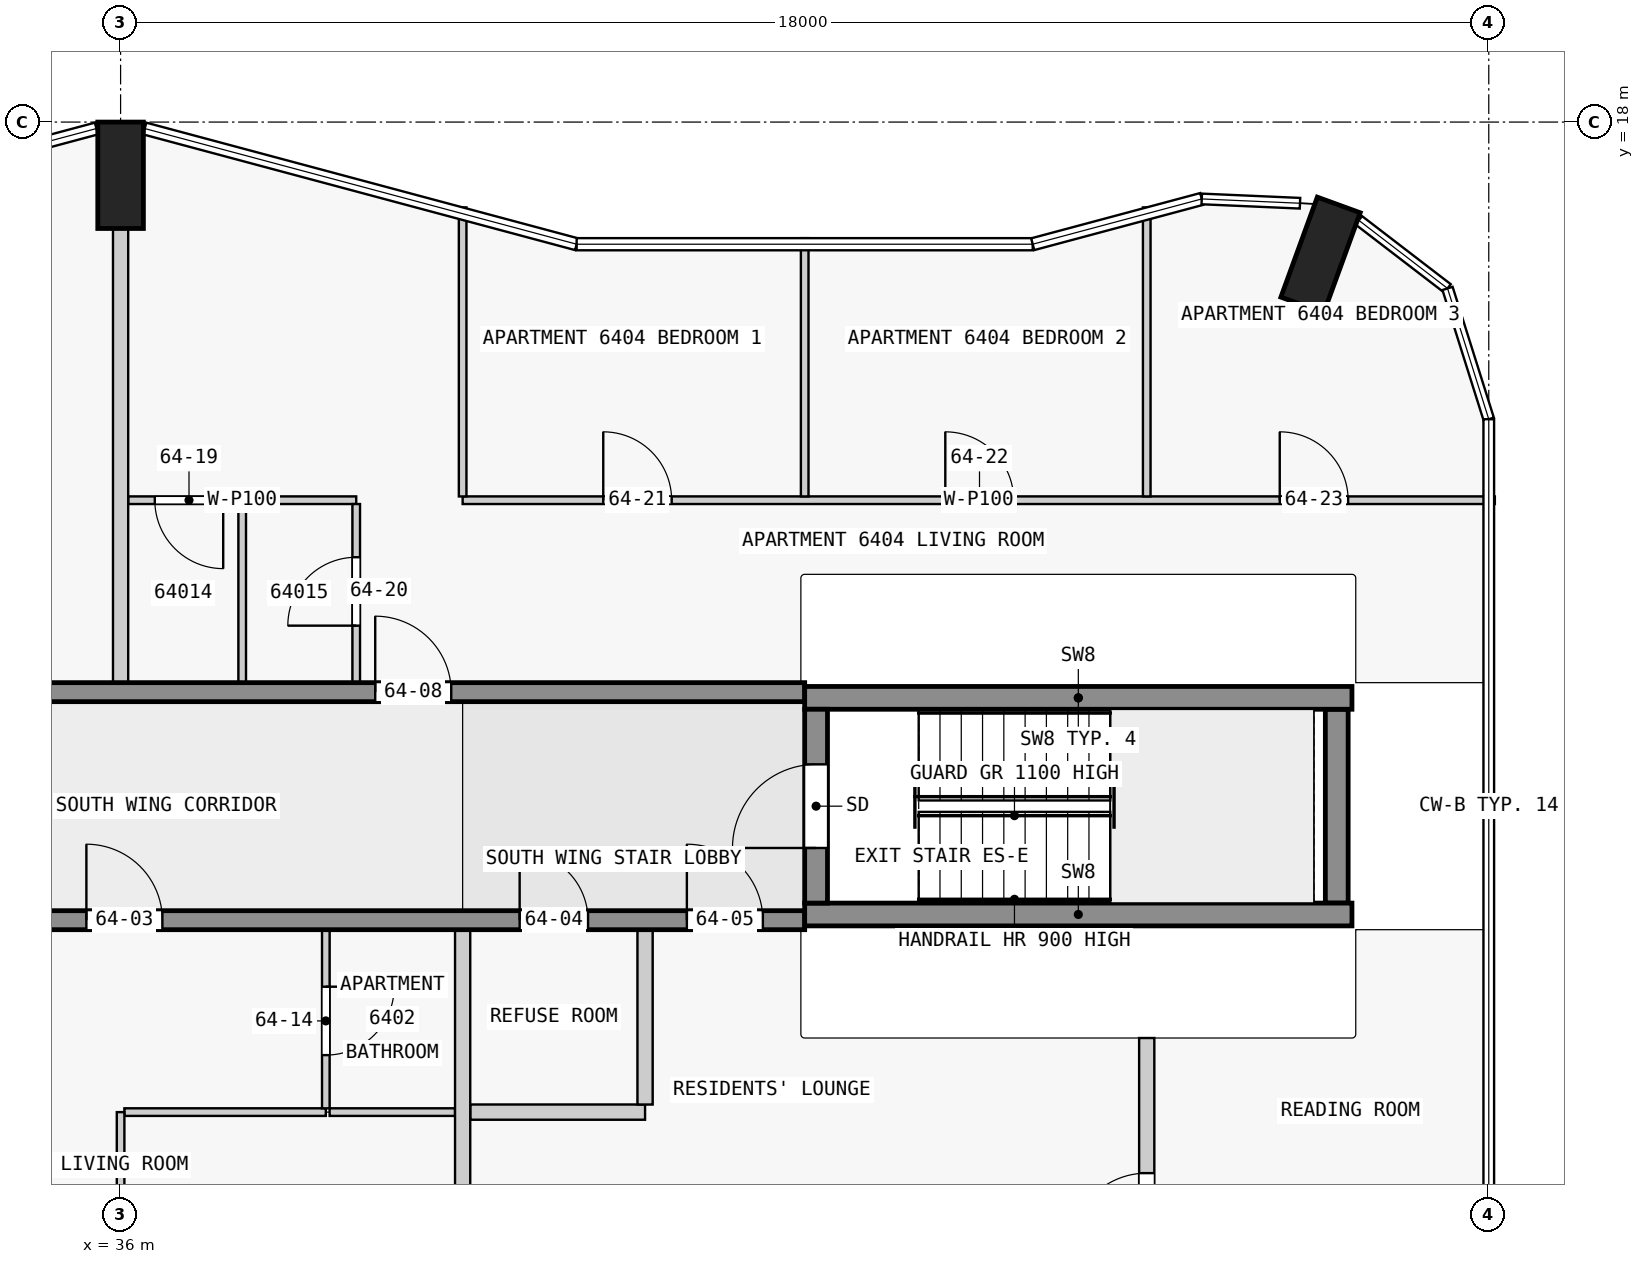
"""IFC4 building model, lengths in metres.
Left out: names, types, materials, properties, quantities, classifications, styles, units other than length and angle.
Written with IfcOpenShell. Run it as: python <this file> out.ifc"""

import sys

from ifc_helpers import new_model, si_unit, direction, frame, frame_2d, origin, origin_2d, place, context, subcontext, project, spatial, rectangle, extrude, element, fill, save


model = new_model("IFC4")
c1 = context("Model", 3, precision=1e-05, world=origin(), true_north=direction((0.0, 1.0)))
c2 = subcontext(c1, "Body", "Model", "MODEL_VIEW")
j1 = project(units=[si_unit("LENGTHUNIT", "METRE"), si_unit("PLANEANGLEUNIT", "RADIAN")], contexts=[c1])
p1 = place(None, origin())
s1 = spatial("IfcSite", under=j1, at=p1, CompositionType="ELEMENT")
p2 = place(p1, origin())
s2 = spatial("IfcBuilding", under=s1, at=p2, CompositionType="ELEMENT")
p3 = place(p2, frame((0.0, 0.0, 245.9)))
s3 = spatial("IfcBuildingStorey", under=s2, at=p3, CompositionType="ELEMENT", Elevation=245.9)
for number, where, z_axis, x_axis in (
    (1, (51.787, 16.252, 0.0), (0.0, 0.0, 1.0), (-0.94, 0.342, 0.0)),
    (2, (36.0, 17.3, 0.0), (0.0, 0.0, 1.0), (1.0, 0.0, 0.0)),
):
    element("IfcColumn", number, at=place(p3, frame(where, z_axis=z_axis, x_axis=x_axis)), inside=s3, PredefinedType="COLUMN", context=c2, shape_type="SweptSolid", body=[
        extrude(rectangle(XDim=0.6, YDim=1.4, at=origin_2d()), origin(), (0.0, 0.0, 1.0), 3.5),
    ])
p4 = place(p3, frame((45.15, 7.725, 0.0), z_axis=(0.0, 0.0, 1.0), x_axis=(0.0, 1.0, 0.0)))
e3 = element("IfcWall", 3, at=p4, inside=s3, PredefinedType="SHEAR", context=c2, shape_type="SweptSolid", body=[
    extrude(rectangle(XDim=2.55, YDim=0.3, at=frame_2d((1.275, 0.0))), origin(), (0.0, 0.0, 1.0), 3.5),
])
p5 = place(p4, frame((0.725, 0.0, 0.0)))
e4 = element("IfcOpeningElement", 4, at=p5, cuts=e3, PredefinedType="OPENING", context=c2, shape_type="SweptSolid", body=[
    extrude(rectangle(XDim=1.1, YDim=2.1, at=frame_2d((0.55, 1.05))), frame((0.0, 0.16, 0.0), z_axis=(0.0, -1.0, 0.0), x_axis=(1.0, 0.0, 0.0)), (0.0, 0.0, 1.0), 0.32),
])
p6 = place(p3, frame((52.0, 7.725, 0.0), z_axis=(0.0, 0.0, 1.0), x_axis=(0.0, 1.0, 0.0)))
e5 = element("IfcWall", 5, at=p6, inside=s3, PredefinedType="SHEAR", context=c2, shape_type="SweptSolid", body=[
    extrude(rectangle(XDim=2.55, YDim=0.3, at=frame_2d((1.275, 0.0))), origin(), (0.0, 0.0, 1.0), 3.5),
])
for number, where, z_axis, x_axis in (
    (6, (45.0, 7.575, 0.0), (0.0, 0.0, 1.0), (1.0, 0.0, 0.0)),
    (7, (45.0, 10.425, 0.0), (0.0, 0.0, 1.0), (1.0, 0.0, 0.0)),
):
    element("IfcWall", number, at=place(p3, frame(where, z_axis=z_axis, x_axis=x_axis)), inside=s3, PredefinedType="SHEAR", context=c2, shape_type="SweptSolid", body=[
        extrude(rectangle(XDim=7.2, YDim=0.3, at=frame_2d((3.6, 0.0))), origin(), (0.0, 0.0, 1.0), 3.5),
    ])
p7 = place(p3, frame((22.5, 7.5, 0.0), z_axis=(0.0, 0.0, 1.0), x_axis=(1.0, 0.0, 0.0)))
e8 = element("IfcWall", 8, at=p7, inside=s3, PredefinedType="SHEAR", context=c2, shape_type="SweptSolid", body=[
    extrude(rectangle(XDim=22.5, YDim=0.25, at=frame_2d((11.25, 0.0))), origin(), (0.0, 0.0, 1.0), 3.25),
])
p8 = place(p7, frame((1.75, 0.0, 0.0)))
e9 = element("IfcOpeningElement", 9, at=p8, cuts=e8, PredefinedType="OPENING", context=c2, shape_type="SweptSolid", body=[
    extrude(rectangle(XDim=1.0, YDim=2.1, at=frame_2d((0.5, 1.05))), frame((0.0, 0.135, 0.0), z_axis=(0.0, -1.0, 0.0), x_axis=(1.0, 0.0, 0.0)), (0.0, 0.0, 1.0), 0.27),
])
p9 = place(p7, frame((5.85, 0.0, 0.0)))
e10 = element("IfcOpeningElement", 10, at=p9, cuts=e8, PredefinedType="OPENING", context=c2, shape_type="SweptSolid", body=[
    extrude(rectangle(XDim=1.8, YDim=2.1, at=frame_2d((0.9, 1.05))), frame((0.0, 0.135, 0.0), z_axis=(0.0, -1.0, 0.0), x_axis=(1.0, 0.0, 0.0)), (0.0, 0.0, 1.0), 0.27),
])
p10 = place(p7, frame((13.05, 0.0, 0.0)))
e11 = element("IfcOpeningElement", 11, at=p10, cuts=e8, PredefinedType="OPENING", context=c2, shape_type="SweptSolid", body=[
    extrude(rectangle(XDim=1.0, YDim=2.1, at=frame_2d((0.5, 1.05))), frame((0.0, 0.135, 0.0), z_axis=(0.0, -1.0, 0.0), x_axis=(1.0, 0.0, 0.0)), (0.0, 0.0, 1.0), 0.27),
])
p11 = place(p7, frame((18.75, 0.0, 0.0)))
e12 = element("IfcOpeningElement", 12, at=p11, cuts=e8, PredefinedType="OPENING", context=c2, shape_type="SweptSolid", body=[
    extrude(rectangle(XDim=0.9, YDim=2.1, at=frame_2d((0.45, 1.05))), frame((0.0, 0.135, 0.0), z_axis=(0.0, -1.0, 0.0), x_axis=(1.0, 0.0, 0.0)), (0.0, 0.0, 1.0), 0.27),
])
p12 = place(p7, frame((20.95, 0.0, 0.0)))
e13 = element("IfcOpeningElement", 13, at=p12, cuts=e8, PredefinedType="OPENING", context=c2, shape_type="SweptSolid", body=[
    extrude(rectangle(XDim=1.0, YDim=2.1, at=frame_2d((0.5, 1.05))), frame((0.0, 0.135, 0.0), z_axis=(0.0, -1.0, 0.0), x_axis=(1.0, 0.0, 0.0)), (0.0, 0.0, 1.0), 0.27),
])
p13 = place(p3, frame((22.5, 10.5, 0.0), z_axis=(0.0, 0.0, 1.0), x_axis=(1.0, 0.0, 0.0)))
e14 = element("IfcWall", 14, at=p13, inside=s3, PredefinedType="SHEAR", context=c2, shape_type="SweptSolid", body=[
    extrude(rectangle(XDim=22.5, YDim=0.25, at=frame_2d((11.25, 0.0))), origin(), (0.0, 0.0, 1.0), 3.25),
])
p14 = place(p13, frame((4.05, 0.0, 0.0)))
e15 = element("IfcOpeningElement", 15, at=p14, cuts=e14, PredefinedType="OPENING", context=c2, shape_type="SweptSolid", body=[
    extrude(rectangle(XDim=1.0, YDim=2.1, at=frame_2d((0.5, 1.05))), frame((0.0, 0.135, 0.0), z_axis=(0.0, -1.0, 0.0), x_axis=(1.0, 0.0, 0.0)), (0.0, 0.0, 1.0), 0.27),
])
p15 = place(p13, frame((10.75, 0.0, 0.0)))
e16 = element("IfcOpeningElement", 16, at=p15, cuts=e14, PredefinedType="OPENING", context=c2, shape_type="SweptSolid", body=[
    extrude(rectangle(XDim=1.0, YDim=2.1, at=frame_2d((0.5, 1.05))), frame((0.0, 0.135, 0.0), z_axis=(0.0, -1.0, 0.0), x_axis=(1.0, 0.0, 0.0)), (0.0, 0.0, 1.0), 0.27),
])
p16 = place(p13, frame((16.85, 0.0, 0.0)))
e17 = element("IfcOpeningElement", 17, at=p16, cuts=e14, PredefinedType="OPENING", context=c2, shape_type="SweptSolid", body=[
    extrude(rectangle(XDim=1.0, YDim=2.1, at=frame_2d((0.5, 1.05))), frame((0.0, 0.135, 0.0), z_axis=(0.0, -1.0, 0.0), x_axis=(1.0, 0.0, 0.0)), (0.0, 0.0, 1.0), 0.27),
])
p17 = place(p3, frame((38.7, 4.975, 0.0), z_axis=(0.0, 0.0, 1.0), x_axis=(-1.0, 0.0, 0.0)))
e18 = element("IfcWall", 18, at=p17, inside=s3, PredefinedType="PARTITIONING", context=c2, shape_type="SweptSolid", body=[
    extrude(rectangle(XDim=2.65, YDim=0.1, at=frame_2d((1.325, 0.0))), origin(), (0.0, 0.0, 1.0), 3.25),
])
p18 = place(p3, frame((38.75, 4.975, 0.0), z_axis=(0.0, 0.0, 1.0), x_axis=(1.0, 0.0, 0.0)))
e19 = element("IfcWall", 19, at=p18, inside=s3, PredefinedType="PARTITIONING", context=c2, shape_type="SweptSolid", body=[
    extrude(rectangle(XDim=1.65, YDim=0.1, at=frame_2d((0.825, 0.0))), origin(), (0.0, 0.0, 1.0), 3.25),
])
p19 = place(p3, frame((40.6, 4.975, 0.0), z_axis=(0.0, 0.0, 1.0), x_axis=(1.0, 0.0, 0.0)))
e20 = element("IfcWall", 20, at=p19, inside=s3, PredefinedType="PARTITIONING", context=c2, shape_type="SweptSolid", body=[
    extrude(rectangle(XDim=2.3, YDim=0.2, at=frame_2d((1.15, 0.0))), origin(), (0.0, 0.0, 1.0), 3.25),
])
p20 = place(p3, frame((39.1, 13.025, 0.0), z_axis=(0.0, 0.0, 1.0), x_axis=(-1.0, 0.0, 0.0)))
e21 = element("IfcWall", 21, at=p20, inside=s3, PredefinedType="PARTITIONING", context=c2, shape_type="SweptSolid", body=[
    extrude(rectangle(XDim=3.0, YDim=0.1, at=frame_2d((1.5, 0.0))), origin(), (0.0, 0.0, 1.0), 3.25),
])
p21 = place(p20, frame((1.75, 0.0, 0.0)))
e22 = element("IfcOpeningElement", 22, at=p21, cuts=e21, PredefinedType="OPENING", context=c2, shape_type="SweptSolid", body=[
    extrude(rectangle(XDim=0.9, YDim=2.1, at=frame_2d((0.45, 1.05))), frame((0.0, 0.06, 0.0), z_axis=(0.0, -1.0, 0.0), x_axis=(1.0, 0.0, 0.0)), (0.0, 0.0, 1.0), 0.12),
])
p22 = place(p3, frame((40.5, 13.025, 0.0), z_axis=(0.0, 0.0, 1.0), x_axis=(1.0, 0.0, 0.0)))
e23 = element("IfcWall", 23, at=p22, inside=s3, PredefinedType="PARTITIONING", context=c2, shape_type="SweptSolid", body=[
    extrude(rectangle(XDim=13.58, YDim=0.1, at=frame_2d((6.79, 0.0))), origin(), (0.0, 0.0, 1.0), 3.25),
])
p23 = place(p22, frame((1.85, 0.0, 0.0)))
e24 = element("IfcOpeningElement", 24, at=p23, cuts=e23, PredefinedType="OPENING", context=c2, shape_type="SweptSolid", body=[
    extrude(rectangle(XDim=0.9, YDim=2.1, at=frame_2d((0.45, 1.05))), frame((0.0, 0.06, 0.0), z_axis=(0.0, -1.0, 0.0), x_axis=(1.0, 0.0, 0.0)), (0.0, 0.0, 1.0), 0.12),
])
p24 = place(p22, frame((6.35, 0.0, 0.0)))
e25 = element("IfcOpeningElement", 25, at=p24, cuts=e23, PredefinedType="OPENING", context=c2, shape_type="SweptSolid", body=[
    extrude(rectangle(XDim=0.9, YDim=2.1, at=frame_2d((0.45, 1.05))), frame((0.0, 0.06, 0.0), z_axis=(0.0, -1.0, 0.0), x_axis=(1.0, 0.0, 0.0)), (0.0, 0.0, 1.0), 0.12),
])
p25 = place(p22, frame((10.75, 0.0, 0.0)))
e26 = element("IfcOpeningElement", 26, at=p25, cuts=e23, PredefinedType="OPENING", context=c2, shape_type="SweptSolid", body=[
    extrude(rectangle(XDim=0.9, YDim=2.1, at=frame_2d((0.45, 1.05))), frame((0.0, 0.06, 0.0), z_axis=(0.0, -1.0, 0.0), x_axis=(1.0, 0.0, 0.0)), (0.0, 0.0, 1.0), 0.12),
])
p26 = place(p3, frame((36.0, 4.975, 0.0), z_axis=(0.0, 0.0, 1.0), x_axis=(0.0, -1.0, 0.0)))
e27 = element("IfcWall", 27, at=p26, inside=s3, PredefinedType="PARTITIONING", context=c2, shape_type="SweptSolid", body=[
    extrude(rectangle(XDim=3.575, YDim=0.1, at=frame_2d((1.788, 0.0))), origin(), (0.0, 0.0, 1.0), 3.25),
])
p27 = place(p26, frame((1.35, 0.0, 0.0)))
e28 = element("IfcOpeningElement", 28, at=p27, cuts=e27, PredefinedType="OPENING", context=c2, shape_type="SweptSolid", body=[
    extrude(rectangle(XDim=0.9, YDim=2.1, at=frame_2d((0.45, 1.05))), frame((0.0, 0.06, 0.0), z_axis=(0.0, -1.0, 0.0), x_axis=(1.0, 0.0, 0.0)), (0.0, 0.0, 1.0), 0.12),
])
p28 = place(p3, frame((36.0, 10.625, 0.0), z_axis=(0.0, 0.0, 1.0), x_axis=(0.0, 1.0, 0.0)))
e29 = element("IfcWall", 29, at=p28, inside=s3, PredefinedType="PARTITIONING", context=c2, shape_type="SweptSolid", body=[
    extrude(rectangle(XDim=5.975, YDim=0.2, at=frame_2d((2.988, 0.0))), origin(), (0.0, 0.0, 1.0), 3.25),
])
p29 = place(p3, frame((37.6, 10.625, 0.0), z_axis=(0.0, 0.0, 1.0), x_axis=(0.0, 1.0, 0.0)))
e30 = element("IfcWall", 30, at=p29, inside=s3, PredefinedType="PARTITIONING", context=c2, shape_type="SweptSolid", body=[
    extrude(rectangle(XDim=2.35, YDim=0.1, at=frame_2d((1.175, 0.0))), origin(), (0.0, 0.0, 1.0), 3.25),
])
p30 = place(p3, frame((38.7, 7.375, 0.0), z_axis=(0.0, 0.0, 1.0), x_axis=(0.0, -1.0, 0.0)))
e31 = element("IfcWall", 31, at=p30, inside=s3, PredefinedType="PARTITIONING", context=c2, shape_type="SweptSolid", body=[
    extrude(rectangle(XDim=2.35, YDim=0.1, at=frame_2d((1.175, 0.0))), origin(), (0.0, 0.0, 1.0), 3.25),
])
p31 = place(p30, frame((0.75, 0.0, 0.0)))
e32 = element("IfcOpeningElement", 32, at=p31, cuts=e31, PredefinedType="OPENING", context=c2, shape_type="SweptSolid", body=[
    extrude(rectangle(XDim=0.9, YDim=2.1, at=frame_2d((0.45, 1.05))), frame((0.0, 0.06, 0.0), z_axis=(0.0, -1.0, 0.0), x_axis=(1.0, 0.0, 0.0)), (0.0, 0.0, 1.0), 0.12),
])
p32 = place(p3, frame((39.1, 10.625, 0.0), z_axis=(0.0, 0.0, 1.0), x_axis=(0.0, 1.0, 0.0)))
e33 = element("IfcWall", 33, at=p32, inside=s3, PredefinedType="PARTITIONING", context=c2, shape_type="SweptSolid", body=[
    extrude(rectangle(XDim=2.35, YDim=0.1, at=frame_2d((1.175, 0.0))), origin(), (0.0, 0.0, 1.0), 3.25),
])
p33 = place(p32, frame((0.75, 0.0, 0.0)))
e34 = element("IfcOpeningElement", 34, at=p33, cuts=e33, PredefinedType="OPENING", context=c2, shape_type="SweptSolid", body=[
    extrude(rectangle(XDim=0.9, YDim=2.1, at=frame_2d((0.45, 1.05))), frame((0.0, 0.06, 0.0), z_axis=(0.0, -1.0, 0.0), x_axis=(1.0, 0.0, 0.0)), (0.0, 0.0, 1.0), 0.12),
])
p34 = place(p3, frame((40.5, 16.878, 0.0), z_axis=(0.0, 0.0, 1.0), x_axis=(0.0, -1.0, 0.0)))
e35 = element("IfcWall", 35, at=p34, inside=s3, PredefinedType="PARTITIONING", context=c2, shape_type="SweptSolid", body=[
    extrude(rectangle(XDim=3.803, YDim=0.1, at=frame_2d((1.901, 0.0))), origin(), (0.0, 0.0, 1.0), 3.25),
])
p35 = place(p3, frame((40.5, 1.122, 0.0), z_axis=(0.0, 0.0, 1.0), x_axis=(0.0, 1.0, 0.0)))
e36 = element("IfcWall", 36, at=p35, inside=s3, PredefinedType="PARTITIONING", context=c2, shape_type="SweptSolid", body=[
    extrude(rectangle(XDim=6.253, YDim=0.2, at=frame_2d((3.126, 0.0))), origin(), (0.0, 0.0, 1.0), 3.25),
])
p36 = place(p3, frame((42.9, 5.075, 0.0), z_axis=(0.0, 0.0, 1.0), x_axis=(0.0, 1.0, 0.0)))
e37 = element("IfcWall", 37, at=p36, inside=s3, PredefinedType="PARTITIONING", context=c2, shape_type="SweptSolid", body=[
    extrude(rectangle(XDim=2.3, YDim=0.2, at=frame_2d((1.15, 0.0))), origin(), (0.0, 0.0, 1.0), 3.25),
])
p37 = place(p3, frame((45.0, 13.075, 0.0), z_axis=(0.0, 0.0, 1.0), x_axis=(0.0, 1.0, 0.0)))
e38 = element("IfcWall", 38, at=p37, inside=s3, PredefinedType="PARTITIONING", context=c2, shape_type="SweptSolid", body=[
    extrude(rectangle(XDim=3.398, YDim=0.1, at=frame_2d((1.699, 0.0))), origin(), (0.0, 0.0, 1.0), 3.25),
])
p38 = place(p3, frame((49.5, 13.075, 0.0), z_axis=(0.0, 0.0, 1.0), x_axis=(0.0, 1.0, 0.0)))
e39 = element("IfcWall", 39, at=p38, inside=s3, PredefinedType="PARTITIONING", context=c2, shape_type="SweptSolid", body=[
    extrude(rectangle(XDim=3.803, YDim=0.1, at=frame_2d((1.901, 0.0))), origin(), (0.0, 0.0, 1.0), 3.25),
])
p39 = place(p3, frame((49.5, 1.122, 0.0), z_axis=(0.0, 0.0, 1.0), x_axis=(0.0, 1.0, 0.0)))
e40 = element("IfcWall", 40, at=p39, inside=s3, PredefinedType="PARTITIONING", context=c2, shape_type="SweptSolid", body=[
    extrude(rectangle(XDim=4.828, YDim=0.2, at=frame_2d((2.414, 0.0))), origin(), (0.0, 0.0, 1.0), 3.25),
])
p40 = place(p39, frame((2.05, 0.0, 0.0)))
e41 = element("IfcOpeningElement", 41, at=p40, cuts=e40, PredefinedType="OPENING", context=c2, shape_type="SweptSolid", body=[
    extrude(rectangle(XDim=1.0, YDim=2.1, at=frame_2d((0.5, 1.05))), frame((0.0, 0.11, 0.0), z_axis=(0.0, -1.0, 0.0), x_axis=(1.0, 0.0, 0.0)), (0.0, 0.0, 1.0), 0.22),
])
p41 = place(p5, origin())
e42 = element("IfcDoor", 42, at=p41, inside=s3, OperationType="SINGLE_SWING_LEFT", PredefinedType="DOOR", context=c2, shape_type="SweptSolid", body=[
    extrude(rectangle(XDim=1.1, YDim=2.1, at=frame_2d((0.55, 1.05))), frame((0.0, 0.025, 0.0), z_axis=(0.0, -1.0, 0.0), x_axis=(1.0, 0.0, 0.0)), (0.0, 0.0, 1.0), 0.05),
])
fill(e4, e42)
p42 = place(p10, origin())
e43 = element("IfcDoor", 43, at=p42, inside=s3, OperationType="SINGLE_SWING_RIGHT", PredefinedType="DOOR", context=c2, shape_type="SweptSolid", body=[
    extrude(rectangle(XDim=1.0, YDim=2.1, at=frame_2d((0.5, 1.05))), frame((0.0, 0.025, 0.0), z_axis=(0.0, -1.0, 0.0), x_axis=(1.0, 0.0, 0.0)), (0.0, 0.0, 1.0), 0.05),
])
fill(e11, e43)
p43 = place(p11, origin())
e44 = element("IfcDoor", 44, at=p43, inside=s3, OperationType="SINGLE_SWING_RIGHT", PredefinedType="DOOR", context=c2, shape_type="SweptSolid", body=[
    extrude(rectangle(XDim=0.9, YDim=2.1, at=frame_2d((0.45, 1.05))), frame((0.0, 0.025, 0.0), z_axis=(0.0, -1.0, 0.0), x_axis=(1.0, 0.0, 0.0)), (0.0, 0.0, 1.0), 0.05),
])
fill(e12, e44)
p44 = place(p12, origin())
e45 = element("IfcDoor", 45, at=p44, inside=s3, OperationType="SINGLE_SWING_RIGHT", PredefinedType="DOOR", context=c2, shape_type="SweptSolid", body=[
    extrude(rectangle(XDim=1.0, YDim=2.1, at=frame_2d((0.5, 1.05))), frame((0.0, 0.025, 0.0), z_axis=(0.0, -1.0, 0.0), x_axis=(1.0, 0.0, 0.0)), (0.0, 0.0, 1.0), 0.05),
])
fill(e13, e45)
p45 = place(p16, origin())
e46 = element("IfcDoor", 46, at=p45, inside=s3, OperationType="SINGLE_SWING_RIGHT", PredefinedType="DOOR", context=c2, shape_type="SweptSolid", body=[
    extrude(rectangle(XDim=1.0, YDim=2.1, at=frame_2d((0.5, 1.05))), frame((0.0, 0.025, 0.0), z_axis=(0.0, -1.0, 0.0), x_axis=(1.0, 0.0, 0.0)), (0.0, 0.0, 1.0), 0.05),
])
fill(e17, e46)
p46 = place(p40, origin())
e47 = element("IfcDoor", 47, at=p46, inside=s3, OperationType="SINGLE_SWING_RIGHT", PredefinedType="DOOR", context=c2, shape_type="SweptSolid", body=[
    extrude(rectangle(XDim=1.0, YDim=2.1, at=frame_2d((0.5, 1.05))), frame((0.0, 0.025, 0.0), z_axis=(0.0, -1.0, 0.0), x_axis=(1.0, 0.0, 0.0)), (0.0, 0.0, 1.0), 0.05),
])
fill(e41, e47)
p47 = place(p31, origin())
e48 = element("IfcDoor", 48, at=p47, inside=s3, OperationType="SINGLE_SWING_RIGHT", PredefinedType="DOOR", context=c2, shape_type="SweptSolid", body=[
    extrude(rectangle(XDim=0.9, YDim=2.1, at=frame_2d((0.45, 1.05))), frame((0.0, 0.025, 0.0), z_axis=(0.0, -1.0, 0.0), x_axis=(1.0, 0.0, 0.0)), (0.0, 0.0, 1.0), 0.05),
])
fill(e32, e48)
p48 = place(p21, origin())
e49 = element("IfcDoor", 49, at=p48, inside=s3, OperationType="SINGLE_SWING_RIGHT", PredefinedType="DOOR", context=c2, shape_type="SweptSolid", body=[
    extrude(rectangle(XDim=0.9, YDim=2.1, at=frame_2d((0.45, 1.05))), frame((0.0, 0.025, 0.0), z_axis=(0.0, -1.0, 0.0), x_axis=(1.0, 0.0, 0.0)), (0.0, 0.0, 1.0), 0.05),
])
fill(e22, e49)
p49 = place(p33, origin())
e50 = element("IfcDoor", 50, at=p49, inside=s3, OperationType="SINGLE_SWING_RIGHT", PredefinedType="DOOR", context=c2, shape_type="SweptSolid", body=[
    extrude(rectangle(XDim=0.9, YDim=2.1, at=frame_2d((0.45, 1.05))), frame((0.0, 0.025, 0.0), z_axis=(0.0, -1.0, 0.0), x_axis=(1.0, 0.0, 0.0)), (0.0, 0.0, 1.0), 0.05),
])
fill(e34, e50)
p50 = place(p23, origin())
e51 = element("IfcDoor", 51, at=p50, inside=s3, OperationType="SINGLE_SWING_LEFT", PredefinedType="DOOR", context=c2, shape_type="SweptSolid", body=[
    extrude(rectangle(XDim=0.9, YDim=2.1, at=frame_2d((0.45, 1.05))), frame((0.0, 0.025, 0.0), z_axis=(0.0, -1.0, 0.0), x_axis=(1.0, 0.0, 0.0)), (0.0, 0.0, 1.0), 0.05),
])
fill(e24, e51)
p51 = place(p24, origin())
e52 = element("IfcDoor", 52, at=p51, inside=s3, OperationType="SINGLE_SWING_RIGHT", PredefinedType="DOOR", context=c2, shape_type="SweptSolid", body=[
    extrude(rectangle(XDim=0.9, YDim=2.1, at=frame_2d((0.45, 1.05))), frame((0.0, 0.025, 0.0), z_axis=(0.0, -1.0, 0.0), x_axis=(1.0, 0.0, 0.0)), (0.0, 0.0, 1.0), 0.05),
])
fill(e25, e52)
p52 = place(p25, origin())
e53 = element("IfcDoor", 53, at=p52, inside=s3, OperationType="SINGLE_SWING_RIGHT", PredefinedType="DOOR", context=c2, shape_type="SweptSolid", body=[
    extrude(rectangle(XDim=0.9, YDim=2.1, at=frame_2d((0.45, 1.05))), frame((0.0, 0.025, 0.0), z_axis=(0.0, -1.0, 0.0), x_axis=(1.0, 0.0, 0.0)), (0.0, 0.0, 1.0), 0.05),
])
fill(e26, e53)
save(model, sys.argv[1])
